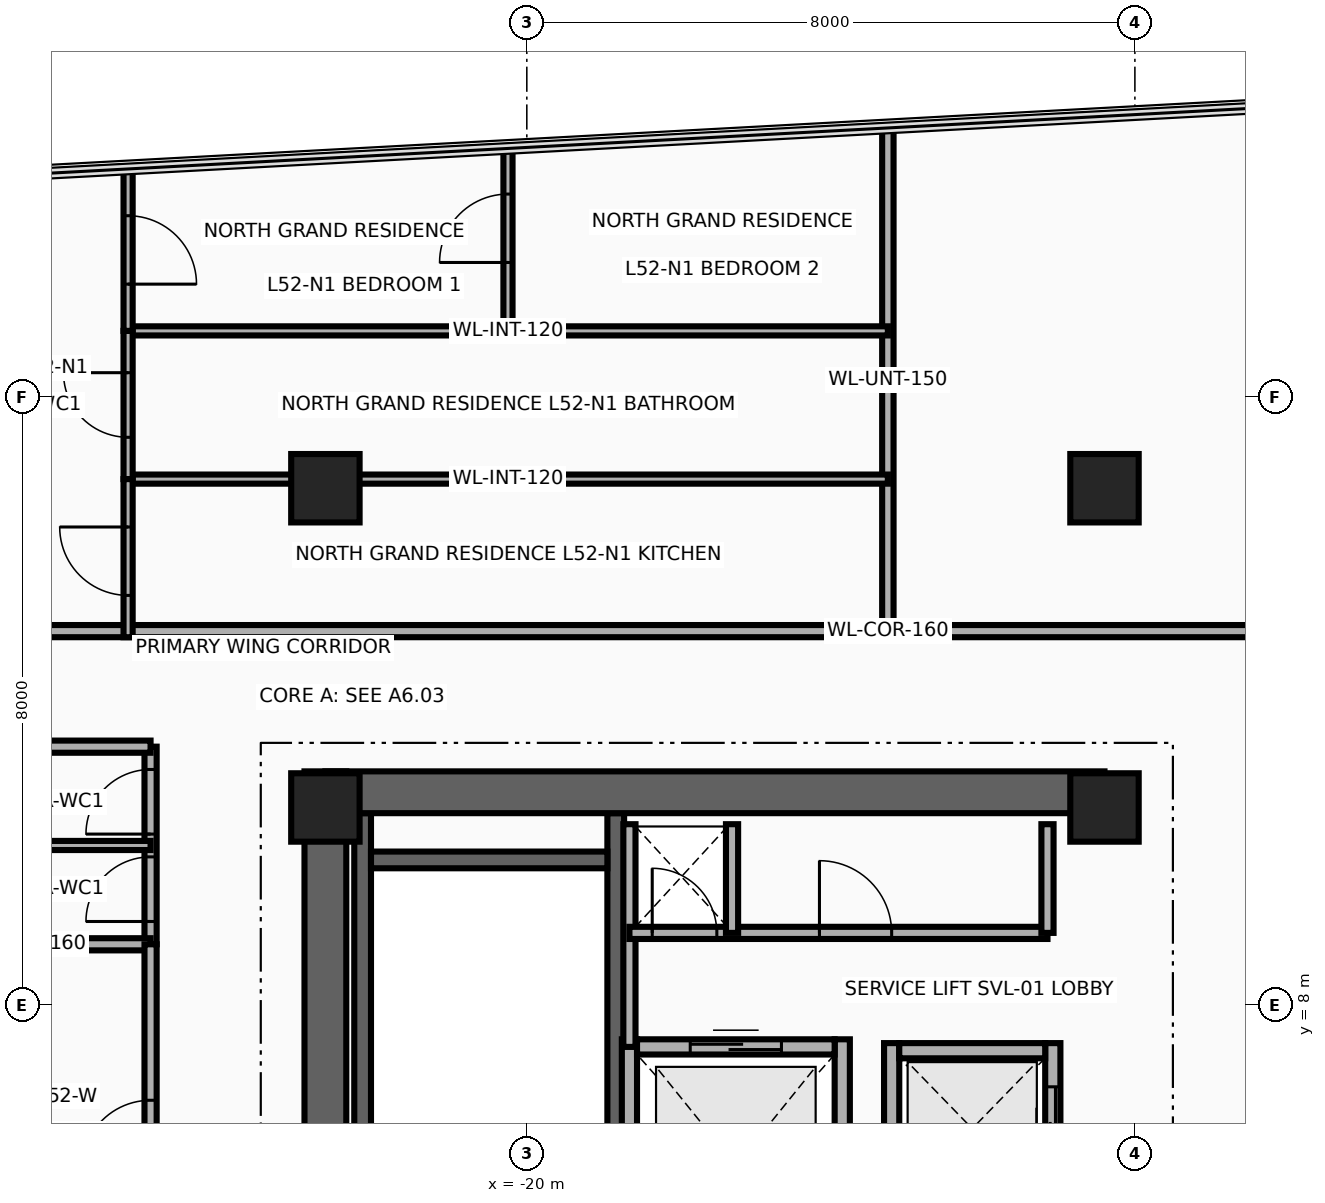
"""IFC4 building model, lengths in metres.
Left out: names, types, materials, properties, quantities, classifications, styles, units other than length and angle.
Written with IfcOpenShell. Run it as: python <this file> out.ifc"""

import sys

from ifc_helpers import new_model, si_unit, direction, frame, frame_2d, origin, origin_2d, place, context, subcontext, project, spatial, rectangle, extrude, source, transform, mapped, element, fill, save


model = new_model("IFC4")
c1 = context("Model", 3, precision=1e-05, world=origin(), true_north=direction((0.0, 1.0)))
c2 = subcontext(c1, "Body", "Model", "MODEL_VIEW")
j1 = project(units=[si_unit("LENGTHUNIT", "METRE"), si_unit("PLANEANGLEUNIT", "RADIAN")], contexts=[c1])
p1 = place(None, origin())
s1 = spatial("IfcSite", under=j1, at=p1, CompositionType="ELEMENT")
p2 = place(p1, origin())
s2 = spatial("IfcBuilding", under=s1, at=p2, CompositionType="ELEMENT")
p3 = place(p2, frame((0.0, 0.0, 205.5)))
s3 = spatial("IfcBuildingStorey", under=s2, at=p3, CompositionType="ELEMENT", Elevation=205.5)
for number, where, z_axis, x_axis in (
    (1, (-22.16, 1.78, 0.0), (0.0, 0.0, 1.0), (0.0, 1.0, 0.0)),
    (2, (-18.83, 1.78, 0.0), (0.0, 0.0, 1.0), (0.0, 1.0, 0.0)),
):
    element("IfcWall", number, at=place(p3, frame(where, z_axis=z_axis, x_axis=x_axis)), inside=s3, PredefinedType="SHEAR", context=c2, shape_type="SweptSolid", body=[
        extrude(rectangle(XDim=8.745, YDim=0.22, at=frame_2d((4.373, 0.0))), origin(), (0.0, 0.0, 1.0), 3.26),
    ])
p4 = place(p3, frame((-22.05, 9.91, 0.0), z_axis=(0.0, 0.0, 1.0), x_axis=(1.0, 0.0, 0.0)))
e3 = element("IfcWall", 3, at=p4, inside=s3, PredefinedType="SHEAR", context=c2, shape_type="SweptSolid", body=[
    extrude(rectangle(XDim=3.11, YDim=0.22, at=frame_2d((1.555, 0.0))), origin(), (0.0, 0.0, 1.0), 3.26),
])
p5 = place(p3, frame((-22.65, -11.075, 0.0), z_axis=(0.0, 0.0, 1.0), x_axis=(0.0, 1.0, 0.0)))
e4 = element("IfcWall", 4, at=p5, inside=s3, PredefinedType="SHEAR", context=c2, shape_type="SweptSolid", body=[
    extrude(rectangle(XDim=22.15, YDim=0.55, at=frame_2d((11.075, 0.0))), origin(), (0.0, 0.0, 1.0), 3.26),
])
p6 = place(p3, frame((-22.65, 10.8, 0.0), z_axis=(0.0, 0.0, 1.0), x_axis=(1.0, 0.0, 0.0)))
e5 = element("IfcWall", 5, at=p6, inside=s3, PredefinedType="SHEAR", context=c2, shape_type="SweptSolid", body=[
    extrude(rectangle(XDim=10.25, YDim=0.55, at=frame_2d((5.125, 0.0))), origin(), (0.0, 0.0, 1.0), 3.26),
])
m1 = source(origin(), c2, "Body", "SweptSolid", [
    extrude(rectangle(XDim=0.9, YDim=0.9, at=origin_2d()), origin(), (0.0, 0.0, 1.0), 3.5),
])
for number, where, z_axis, x_axis in (
    (6, (-22.65, 10.6, 0.0), (0.0, 0.0, 1.0), (1.0, 0.0, 0.0)),
    (7, (-12.4, 10.6, 0.0), (0.0, 0.0, 1.0), (1.0, 0.0, 0.0)),
    (8, (-22.65, 14.8, 0.0), (0.0, 0.0, 1.0), (1.0, 0.0, 0.0)),
    (9, (-12.4, 14.8, 0.0), (0.0, 0.0, 1.0), (1.0, 0.0, 0.0)),
):
    element("IfcColumn", number, at=place(p3, frame(where, z_axis=z_axis, x_axis=x_axis)), inside=s3, PredefinedType="COLUMN", context=c2, shape_type="MappedRepresentation", body=[
        mapped(m1, transform((0.0, 0.0, 0.0), x_axis=(1.0, 0.0, 0.0), y_axis=(0.0, 1.0, 0.0), z_axis=(0.0, 0.0, 1.0), scale=1.0)),
    ])
for number, where, z_axis, x_axis in (
    (10, (-18.65, 4.225, 0.0), (0.0, 0.0, 1.0), (0.0, 1.0, 0.0)),
    (11, (-15.85, 4.225, 0.0), (0.0, 0.0, 1.0), (0.0, 1.0, 0.0)),
):
    element("IfcWall", number, at=place(p3, frame(where, z_axis=z_axis, x_axis=x_axis)), inside=s3, PredefinedType="MOVABLE", context=c2, shape_type="SweptSolid", body=[
        extrude(rectangle(XDim=3.325, YDim=0.2, at=frame_2d((1.663, 0.0))), origin(), (0.0, 0.0, 1.0), 3.26),
    ])
p7 = place(p3, frame((-18.55, 7.45, 0.0), z_axis=(0.0, 0.0, 1.0), x_axis=(1.0, 0.0, 0.0)))
e12 = element("IfcWall", 12, at=p7, inside=s3, PredefinedType="MOVABLE", context=c2, shape_type="SweptSolid", body=[
    extrude(rectangle(XDim=2.6, YDim=0.2, at=frame_2d((1.3, 0.0))), origin(), (0.0, 0.0, 1.0), 3.26),
])
p8 = place(p7, frame((0.7, 0.0, 0.0)))
e13 = element("IfcOpeningElement", 13, at=p8, cuts=e12, PredefinedType="OPENING", context=c2, shape_type="SweptSolid", body=[
    extrude(rectangle(XDim=1.2, YDim=2.1, at=frame_2d((0.6, 1.05))), frame((0.0, 0.115, 0.0), z_axis=(0.0, -1.0, 0.0), x_axis=(1.0, 0.0, 0.0)), (0.0, 0.0, 1.0), 0.23),
])
p9 = place(p3, frame((-15.2, 5.25, 0.0), z_axis=(0.0, 0.0, 1.0), x_axis=(0.0, 1.0, 0.0)))
e14 = element("IfcWall", 14, at=p9, inside=s3, PredefinedType="MOVABLE", context=c2, shape_type="SweptSolid", body=[
    extrude(rectangle(XDim=2.25, YDim=0.2, at=frame_2d((1.125, 0.0))), origin(), (0.0, 0.0, 1.0), 3.26),
])
p10 = place(p3, frame((-13.08, 5.25, 0.0), z_axis=(0.0, 0.0, 1.0), x_axis=(0.0, 1.0, 0.0)))
e15 = element("IfcWall", 15, at=p10, inside=s3, PredefinedType="MOVABLE", context=c2, shape_type="SweptSolid", body=[
    extrude(rectangle(XDim=2.25, YDim=0.2, at=frame_2d((1.125, 0.0))), origin(), (0.0, 0.0, 1.0), 3.26),
])
p11 = place(p10, frame((0.575, 0.0, 0.0)))
e16 = element("IfcOpeningElement", 16, at=p11, cuts=e15, PredefinedType="OPENING", context=c2, shape_type="SweptSolid", body=[
    extrude(rectangle(XDim=1.1, YDim=2.1, at=frame_2d((0.55, 1.05))), frame((0.0, 0.115, 0.0), z_axis=(0.0, -1.0, 0.0), x_axis=(1.0, 0.0, 0.0)), (0.0, 0.0, 1.0), 0.23),
])
p12 = place(p3, frame((-15.1, 7.4, 0.0), z_axis=(0.0, 0.0, 1.0), x_axis=(1.0, 0.0, 0.0)))
e17 = element("IfcWall", 17, at=p12, inside=s3, PredefinedType="MOVABLE", context=c2, shape_type="SweptSolid", body=[
    extrude(rectangle(XDim=1.92, YDim=0.2, at=frame_2d((0.96, 0.0))), origin(), (0.0, 0.0, 1.0), 3.26),
])
p13 = place(p3, frame((-18.65, 7.45, 0.0), z_axis=(0.0, 0.0, 1.0), x_axis=(0.0, 1.0, 0.0)))
e18 = element("IfcWall", 18, at=p13, inside=s3, PredefinedType="PARTITIONING", context=c2, shape_type="SweptSolid", body=[
    extrude(rectangle(XDim=2.93, YDim=0.16, at=frame_2d((1.465, 0.0))), origin(), (0.0, 0.0, 1.0), 3.26),
])
p14 = place(p3, frame((-18.65, 8.95, 0.0), z_axis=(0.0, 0.0, 1.0), x_axis=(1.0, 0.0, 0.0)))
e19 = element("IfcWall", 19, at=p14, inside=s3, PredefinedType="PARTITIONING", context=c2, shape_type="SweptSolid", body=[
    extrude(rectangle(XDim=5.5, YDim=0.16, at=frame_2d((2.75, 0.0))), origin(), (0.0, 0.0, 1.0), 3.26),
])
p15 = place(p14, frame((0.3, 0.0, 0.0)))
e20 = element("IfcOpeningElement", 20, at=p15, cuts=e19, PredefinedType="OPENING", context=c2, shape_type="SweptSolid", body=[
    extrude(rectangle(XDim=0.85, YDim=2.05, at=frame_2d((0.425, 1.025))), frame((0.0, 0.095, 0.0), z_axis=(0.0, -1.0, 0.0), x_axis=(1.0, 0.0, 0.0)), (0.0, 0.0, 1.0), 0.19),
])
p16 = place(p14, frame((2.5, 0.0, 0.0)))
e21 = element("IfcOpeningElement", 21, at=p16, cuts=e19, PredefinedType="OPENING", context=c2, shape_type="SweptSolid", body=[
    extrude(rectangle(XDim=0.95, YDim=2.15, at=frame_2d((0.475, 1.075))), frame((0.0, 0.095, 0.0), z_axis=(0.0, -1.0, 0.0), x_axis=(1.0, 0.0, 0.0)), (0.0, 0.0, 1.0), 0.19),
])
for number, where, z_axis, x_axis in (
    (22, (-13.15, 8.95, 0.0), (0.0, 0.0, 1.0), (0.0, 1.0, 0.0)),
    (23, (-17.3, 8.95, 0.0), (0.0, 0.0, 1.0), (0.0, 1.0, 0.0)),
):
    element("IfcWall", number, at=place(p3, frame(where, z_axis=z_axis, x_axis=x_axis)), inside=s3, PredefinedType="PARTITIONING", context=c2, shape_type="SweptSolid", body=[
        extrude(rectangle(XDim=1.43, YDim=0.16, at=frame_2d((0.715, 0.0))), origin(), (0.0, 0.0, 1.0), 3.26),
    ])
p17 = place(p3, frame((-24.95, 8.8, 0.0), z_axis=(0.0, 0.0, 1.0), x_axis=(0.0, 1.0, 0.0)))
e24 = element("IfcWall", 24, at=p17, inside=s3, PredefinedType="PARTITIONING", context=c2, shape_type="SweptSolid", body=[
    extrude(rectangle(XDim=2.6, YDim=0.16, at=frame_2d((1.3, 0.0))), origin(), (0.0, 0.0, 1.0), 2.544),
])
p18 = place(p17, frame((0.3, 0.0, 0.0)))
e25 = element("IfcOpeningElement", 25, at=p18, cuts=e24, PredefinedType="OPENING", context=c2, shape_type="SweptSolid", body=[
    extrude(rectangle(XDim=0.85, YDim=2.1, at=frame_2d((0.425, 1.05))), frame((0.0, 0.095, 0.0), z_axis=(0.0, -1.0, 0.0), x_axis=(1.0, 0.0, 0.0)), (0.0, 0.0, 1.0), 0.19),
])
p19 = place(p17, frame((1.45, 0.0, 0.0)))
e26 = element("IfcOpeningElement", 26, at=p19, cuts=e24, PredefinedType="OPENING", context=c2, shape_type="SweptSolid", body=[
    extrude(rectangle(XDim=0.85, YDim=2.1, at=frame_2d((0.425, 1.05))), frame((0.0, 0.095, 0.0), z_axis=(0.0, -1.0, 0.0), x_axis=(1.0, 0.0, 0.0)), (0.0, 0.0, 1.0), 0.19),
])
for number, where, z_axis, x_axis in (
    (27, (-28.25, 8.8, 0.0), (0.0, 0.0, 1.0), (1.0, 0.0, 0.0)),
    (28, (-28.25, 11.4, 0.0), (0.0, 0.0, 1.0), (1.0, 0.0, 0.0)),
):
    element("IfcWall", number, at=place(p3, frame(where, z_axis=z_axis, x_axis=x_axis)), inside=s3, PredefinedType="PARTITIONING", context=c2, shape_type="SweptSolid", body=[
        extrude(rectangle(XDim=3.3, YDim=0.16, at=frame_2d((1.65, 0.0))), origin(), (0.0, 0.0, 1.0), 3.26),
    ])
p20 = place(p3, frame((-28.25, 10.1, 0.0), z_axis=(0.0, 0.0, 1.0), x_axis=(1.0, 0.0, 0.0)))
e29 = element("IfcWall", 29, at=p20, inside=s3, PredefinedType="PARTITIONING", context=c2, shape_type="SweptSolid", body=[
    extrude(rectangle(XDim=3.3, YDim=0.12, at=frame_2d((1.65, 0.0))), origin(), (0.0, 0.0, 1.0), 3.26),
])
p21 = place(p3, frame((-24.95, -17.54, 0.0), z_axis=(0.0, 0.0, 1.0), x_axis=(0.0, 1.0, 0.0)))
e30 = element("IfcWall", 30, at=p21, inside=s3, PredefinedType="PARTITIONING", context=c2, shape_type="SweptSolid", body=[
    extrude(rectangle(XDim=26.34, YDim=0.16, at=frame_2d((13.17, 0.0))), origin(), (0.0, 0.0, 1.0), 2.544),
])
p22 = place(p21, frame((4.122, 0.0, 0.0)))
e31 = element("IfcOpeningElement", 31, at=p22, cuts=e30, PredefinedType="OPENING", context=c2, shape_type="SweptSolid", body=[
    extrude(rectangle(XDim=0.95, YDim=2.15, at=frame_2d((0.475, 1.075))), frame((0.0, 0.095, 0.0), z_axis=(0.0, -1.0, 0.0), x_axis=(1.0, 0.0, 0.0)), (0.0, 0.0, 1.0), 0.19),
])
p23 = place(p21, frame((18.383, 0.0, 0.0)))
e32 = element("IfcOpeningElement", 32, at=p23, cuts=e30, PredefinedType="OPENING", context=c2, shape_type="SweptSolid", body=[
    extrude(rectangle(XDim=0.9, YDim=2.1, at=frame_2d((0.45, 1.05))), frame((0.0, 0.095, 0.0), z_axis=(0.0, -1.0, 0.0), x_axis=(1.0, 0.0, 0.0)), (0.0, 0.0, 1.0), 0.19),
])
p24 = place(p21, frame((23.388, 0.0, 0.0)))
e33 = element("IfcOpeningElement", 33, at=p24, cuts=e30, PredefinedType="OPENING", context=c2, shape_type="SweptSolid", body=[
    extrude(rectangle(XDim=0.9, YDim=2.1, at=frame_2d((0.45, 1.05))), frame((0.0, 0.095, 0.0), z_axis=(0.0, -1.0, 0.0), x_axis=(1.0, 0.0, 0.0)), (0.0, 0.0, 1.0), 0.19),
])
p25 = place(p3, frame((-30.89, 12.92, 0.0), z_axis=(0.0, 0.0, 1.0), x_axis=(1.0, 0.0, 0.0)))
e34 = element("IfcWall", 34, at=p25, inside=s3, PredefinedType="PARTITIONING", context=c2, shape_type="SweptSolid", body=[
    extrude(rectangle(XDim=31.28, YDim=0.16, at=frame_2d((15.64, 0.0))), origin(), (0.0, 0.0, 1.0), 2.634),
])
p26 = place(p25, frame((2.347, 0.0, 0.0)))
e35 = element("IfcOpeningElement", 35, at=p26, cuts=e34, PredefinedType="OPENING", context=c2, shape_type="SweptSolid", body=[
    extrude(rectangle(XDim=0.95, YDim=2.15, at=frame_2d((0.475, 1.075))), frame((0.0, 0.095, 0.0), z_axis=(0.0, -1.0, 0.0), x_axis=(1.0, 0.0, 0.0)), (0.0, 0.0, 1.0), 0.19),
])
p27 = place(p25, frame((22.56, 0.0, 0.0)))
e36 = element("IfcOpeningElement", 36, at=p27, cuts=e34, PredefinedType="OPENING", context=c2, shape_type="SweptSolid", body=[
    extrude(rectangle(XDim=1.8, YDim=2.15, at=frame_2d((0.9, 1.075))), frame((0.0, 0.095, 0.0), z_axis=(0.0, -1.0, 0.0), x_axis=(1.0, 0.0, 0.0)), (0.0, 0.0, 1.0), 0.19),
])
p28 = place(p3, frame((-15.25, 12.92, 0.0), z_axis=(0.0, 0.0, 1.0), x_axis=(0.0, 1.0, 0.0)))
e37 = element("IfcWall", 37, at=p28, inside=s3, PredefinedType="PARTITIONING", context=c2, shape_type="SweptSolid", body=[
    extrude(rectangle(XDim=6.62, YDim=0.15, at=frame_2d((3.31, 0.0))), origin(), (0.0, 0.0, 1.0), 2.544),
])
p29 = place(p3, frame((-25.246, 14.92, 0.0), z_axis=(0.0, 0.0, 1.0), x_axis=(1.0, 0.0, 0.0)))
e38 = element("IfcWall", 38, at=p29, inside=s3, PredefinedType="PARTITIONING", context=c2, shape_type="SweptSolid", body=[
    extrude(rectangle(XDim=9.996, YDim=0.12, at=frame_2d((4.998, 0.0))), origin(), (0.0, 0.0, 1.0), 2.544),
])
p30 = place(p3, frame((-25.246, 16.87, 0.0), z_axis=(0.0, 0.0, 1.0), x_axis=(1.0, 0.0, 0.0)))
e39 = element("IfcWall", 39, at=p30, inside=s3, PredefinedType="PARTITIONING", context=c2, shape_type="SweptSolid", body=[
    extrude(rectangle(XDim=9.996, YDim=0.12, at=frame_2d((4.998, 0.0))), origin(), (0.0, 0.0, 1.0), 3.26),
])
p31 = place(p3, frame((-25.246, 14.92, 0.0), z_axis=(0.0, 0.0, 1.0), x_axis=(0.0, 1.0, 0.0)))
e40 = element("IfcWall", 40, at=p31, inside=s3, PredefinedType="PARTITIONING", context=c2, shape_type="SweptSolid", body=[
    extrude(rectangle(XDim=1.95, YDim=0.12, at=frame_2d((0.975, 0.0))), origin(), (0.0, 0.0, 1.0), 2.544),
])
p32 = place(p31, frame((0.55, 0.0, 0.0)))
e41 = element("IfcOpeningElement", 41, at=p32, cuts=e40, PredefinedType="OPENING", context=c2, shape_type="SweptSolid", body=[
    extrude(rectangle(XDim=0.85, YDim=2.1, at=frame_2d((0.425, 1.05))), frame((0.0, 0.075, 0.0), z_axis=(0.0, -1.0, 0.0), x_axis=(1.0, 0.0, 0.0)), (0.0, 0.0, 1.0), 0.15),
])
p33 = place(p3, frame((-25.246, 12.84, 0.0), z_axis=(0.0, 0.0, 1.0), x_axis=(0.0, 1.0, 0.0)))
e42 = element("IfcWall", 42, at=p33, inside=s3, PredefinedType="PARTITIONING", context=c2, shape_type="SweptSolid", body=[
    extrude(rectangle(XDim=2.08, YDim=0.12, at=frame_2d((1.04, 0.0))), origin(), (0.0, 0.0, 1.0), 2.544),
])
p34 = place(p33, frame((0.55, 0.0, 0.0)))
e43 = element("IfcOpeningElement", 43, at=p34, cuts=e42, PredefinedType="OPENING", context=c2, shape_type="SweptSolid", body=[
    extrude(rectangle(XDim=0.9, YDim=2.1, at=frame_2d((0.45, 1.05))), frame((0.0, 0.075, 0.0), z_axis=(0.0, -1.0, 0.0), x_axis=(1.0, 0.0, 0.0)), (0.0, 0.0, 1.0), 0.15),
])
p35 = place(p3, frame((-25.246, 16.87, 0.0), z_axis=(0.0, 0.0, 1.0), x_axis=(0.0, 1.0, 0.0)))
e44 = element("IfcWall", 44, at=p35, inside=s3, PredefinedType="PARTITIONING", context=c2, shape_type="SweptSolid", body=[
    extrude(rectangle(XDim=2.13, YDim=0.12, at=frame_2d((1.065, 0.0))), origin(), (0.0, 0.0, 1.0), 3.26),
])
p36 = place(p35, frame((0.615, 0.0, 0.0)))
e45 = element("IfcOpeningElement", 45, at=p36, cuts=e44, PredefinedType="OPENING", context=c2, shape_type="SweptSolid", body=[
    extrude(rectangle(XDim=0.9, YDim=2.1, at=frame_2d((0.45, 1.05))), frame((0.0, 0.075, 0.0), z_axis=(0.0, -1.0, 0.0), x_axis=(1.0, 0.0, 0.0)), (0.0, 0.0, 1.0), 0.15),
])
p37 = place(p3, frame((-20.248, 16.87, 0.0), z_axis=(0.0, 0.0, 1.0), x_axis=(0.0, 1.0, 0.0)))
e46 = element("IfcWall", 46, at=p37, inside=s3, PredefinedType="PARTITIONING", context=c2, shape_type="SweptSolid", body=[
    extrude(rectangle(XDim=2.4, YDim=0.12, at=frame_2d((1.2, 0.0))), origin(), (0.0, 0.0, 1.0), 3.26),
])
p38 = place(p37, frame((0.9, 0.0, 0.0)))
e47 = element("IfcOpeningElement", 47, at=p38, cuts=e46, PredefinedType="OPENING", context=c2, shape_type="SweptSolid", body=[
    extrude(rectangle(XDim=0.9, YDim=2.1, at=frame_2d((0.45, 1.05))), frame((0.0, 0.075, 0.0), z_axis=(0.0, -1.0, 0.0), x_axis=(1.0, 0.0, 0.0)), (0.0, 0.0, 1.0), 0.15),
])
p39 = place(p8, origin())
e48 = element("IfcDoor", 48, at=p39, inside=s3, OperationType="DOUBLE_DOOR_SLIDING", PredefinedType="DOOR", context=c2, shape_type="SweptSolid", body=[
    extrude(rectangle(XDim=1.2, YDim=2.1, at=frame_2d((0.6, 1.05))), frame((0.0, 0.025, 0.0), z_axis=(0.0, -1.0, 0.0), x_axis=(1.0, 0.0, 0.0)), (0.0, 0.0, 1.0), 0.05),
])
fill(e13, e48)
p40 = place(p11, origin())
e49 = element("IfcDoor", 49, at=p40, inside=s3, OperationType="DOUBLE_DOOR_SLIDING", PredefinedType="DOOR", context=c2, shape_type="SweptSolid", body=[
    extrude(rectangle(XDim=1.1, YDim=2.1, at=frame_2d((0.55, 1.05))), frame((0.0, 0.025, 0.0), z_axis=(0.0, -1.0, 0.0), x_axis=(1.0, 0.0, 0.0)), (0.0, 0.0, 1.0), 0.05),
])
fill(e16, e49)
p41 = place(p15, origin())
e50 = element("IfcDoor", 50, at=p41, inside=s3, OperationType="SINGLE_SWING_LEFT", PredefinedType="DOOR", context=c2, shape_type="SweptSolid", body=[
    extrude(rectangle(XDim=0.85, YDim=2.05, at=frame_2d((0.425, 1.025))), frame((0.0, 0.025, 0.0), z_axis=(0.0, -1.0, 0.0), x_axis=(1.0, 0.0, 0.0)), (0.0, 0.0, 1.0), 0.05),
])
fill(e20, e50)
p42 = place(p16, origin())
e51 = element("IfcDoor", 51, at=p42, inside=s3, OperationType="SINGLE_SWING_RIGHT", PredefinedType="DOOR", context=c2, shape_type="SweptSolid", body=[
    extrude(rectangle(XDim=0.95, YDim=2.15, at=frame_2d((0.475, 1.075))), frame((0.0, 0.025, 0.0), z_axis=(0.0, -1.0, 0.0), x_axis=(1.0, 0.0, 0.0)), (0.0, 0.0, 1.0), 0.05),
])
fill(e21, e51)
p43 = place(p18, origin())
e52 = element("IfcDoor", 52, at=p43, inside=s3, OperationType="SINGLE_SWING_LEFT", PredefinedType="DOOR", context=c2, shape_type="SweptSolid", body=[
    extrude(rectangle(XDim=0.85, YDim=2.1, at=frame_2d((0.425, 1.05))), frame((0.0, 0.025, 0.0), z_axis=(0.0, -1.0, 0.0), x_axis=(1.0, 0.0, 0.0)), (0.0, 0.0, 1.0), 0.05),
])
fill(e25, e52)
p44 = place(p19, origin())
e53 = element("IfcDoor", 53, at=p44, inside=s3, OperationType="SINGLE_SWING_RIGHT", PredefinedType="DOOR", context=c2, shape_type="SweptSolid", body=[
    extrude(rectangle(XDim=0.85, YDim=2.1, at=frame_2d((0.425, 1.05))), frame((0.0, 0.025, 0.0), z_axis=(0.0, -1.0, 0.0), x_axis=(1.0, 0.0, 0.0)), (0.0, 0.0, 1.0), 0.05),
])
fill(e26, e53)
p45 = place(p24, origin())
e54 = element("IfcDoor", 54, at=p45, inside=s3, OperationType="SINGLE_SWING_RIGHT", PredefinedType="DOOR", context=c2, shape_type="SweptSolid", body=[
    extrude(rectangle(XDim=0.9, YDim=2.1, at=frame_2d((0.45, 1.05))), frame((0.0, 0.025, 0.0), z_axis=(0.0, -1.0, 0.0), x_axis=(1.0, 0.0, 0.0)), (0.0, 0.0, 1.0), 0.05),
])
fill(e33, e54)
p46 = place(p32, origin())
e55 = element("IfcDoor", 55, at=p46, inside=s3, OperationType="SINGLE_SWING_LEFT", PredefinedType="DOOR", context=c2, shape_type="SweptSolid", body=[
    extrude(rectangle(XDim=0.85, YDim=2.1, at=frame_2d((0.425, 1.05))), frame((0.0, 0.025, 0.0), z_axis=(0.0, -1.0, 0.0), x_axis=(1.0, 0.0, 0.0)), (0.0, 0.0, 1.0), 0.05),
])
fill(e41, e55)
p47 = place(p34, origin())
e56 = element("IfcDoor", 56, at=p47, inside=s3, OperationType="SINGLE_SWING_RIGHT", PredefinedType="DOOR", context=c2, shape_type="SweptSolid", body=[
    extrude(rectangle(XDim=0.9, YDim=2.1, at=frame_2d((0.45, 1.05))), frame((0.0, 0.025, 0.0), z_axis=(0.0, -1.0, 0.0), x_axis=(1.0, 0.0, 0.0)), (0.0, 0.0, 1.0), 0.05),
])
fill(e43, e56)
p48 = place(p36, frame((0.9, 0.0, 0.0), z_axis=(0.0, 0.0, 1.0), x_axis=(-1.0, 0.0, 0.0)))
e57 = element("IfcDoor", 57, at=p48, inside=s3, OperationType="SINGLE_SWING_LEFT", PredefinedType="DOOR", context=c2, shape_type="SweptSolid", body=[
    extrude(rectangle(XDim=0.9, YDim=2.1, at=frame_2d((0.45, 1.05))), frame((0.0, 0.025, 0.0), z_axis=(0.0, -1.0, 0.0), x_axis=(1.0, 0.0, 0.0)), (0.0, 0.0, 1.0), 0.05),
])
fill(e45, e57)
p49 = place(p38, origin())
e58 = element("IfcDoor", 58, at=p49, inside=s3, OperationType="SINGLE_SWING_RIGHT", PredefinedType="DOOR", context=c2, shape_type="SweptSolid", body=[
    extrude(rectangle(XDim=0.9, YDim=2.1, at=frame_2d((0.45, 1.05))), frame((0.0, 0.025, 0.0), z_axis=(0.0, -1.0, 0.0), x_axis=(1.0, 0.0, 0.0)), (0.0, 0.0, 1.0), 0.05),
])
fill(e47, e58)
save(model, sys.argv[1])
